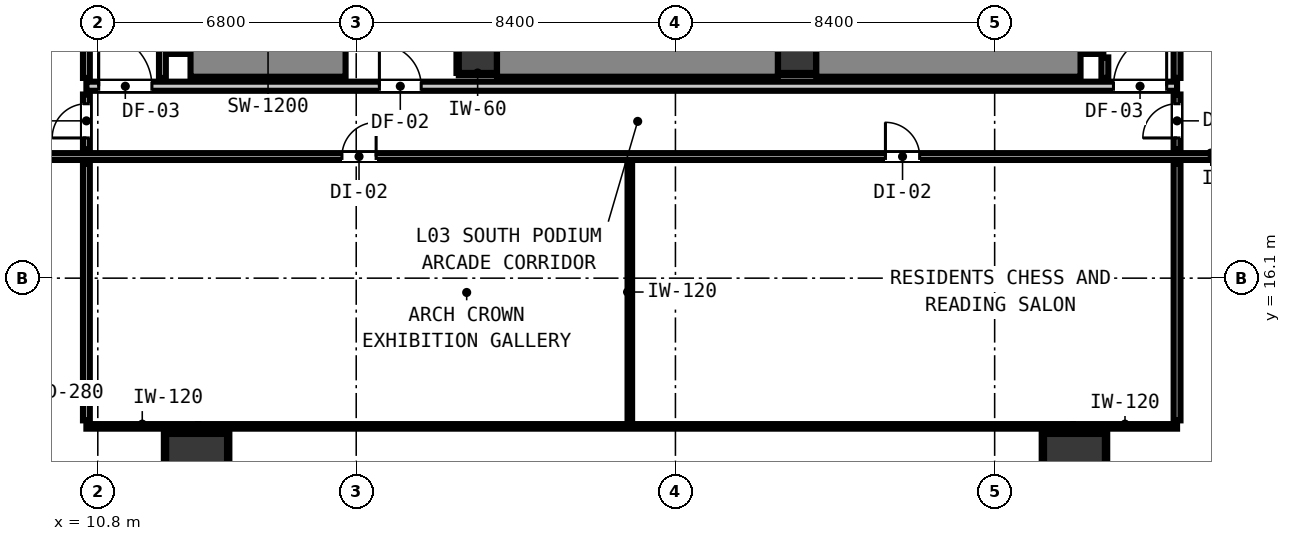
"""IFC4 building model, lengths in metres.
Left out: names, types, materials, properties, quantities, classifications, styles, units other than length and angle.
Written with IfcOpenShell. Run it as: python <this file> out.ifc"""

import sys

from ifc_helpers import new_model, si_unit, direction, frame, frame_2d, origin, origin_2d, place, context, subcontext, project, spatial, rectangle, extrude, element, fill, save


model = new_model("IFC4")
c1 = context("Model", 3, precision=1e-05, world=origin(), true_north=direction((0.0, 1.0)))
c2 = subcontext(c1, "Body", "Model", "MODEL_VIEW")
j1 = project(units=[si_unit("LENGTHUNIT", "METRE"), si_unit("PLANEANGLEUNIT", "RADIAN")], contexts=[c1])
p1 = place(None, origin())
s1 = spatial("IfcSite", under=j1, at=p1, CompositionType="ELEMENT")
p2 = place(p1, origin())
s2 = spatial("IfcBuilding", under=s1, at=p2, CompositionType="ELEMENT")
p3 = place(p2, frame((0.0, 0.0, 13.6)))
s3 = spatial("IfcBuildingStorey", under=s2, at=p3, CompositionType="ELEMENT", Elevation=13.6)
for number, where, z_axis, x_axis in (
    (1, (20.8, 22.0, 0.0), (0.0, 0.0, 1.0), (1.0, 0.0, 0.0)),
    (2, (29.2, 22.0, 0.0), (0.0, 0.0, 1.0), (1.0, 0.0, 0.0)),
):
    element("IfcColumn", number, at=place(p3, frame(where, z_axis=z_axis, x_axis=x_axis)), inside=s3, PredefinedType="COLUMN", context=c2, shape_type="SweptSolid", body=[
        extrude(rectangle(XDim=1.0, YDim=1.0, at=origin_2d()), origin(), (0.0, 0.0, 1.0), 4.2),
    ])
p4 = place(p3, frame((13.24, 22.0, 0.0), z_axis=(0.0, 0.0, 1.0), x_axis=(0.0, 1.0, 0.0)))
e3 = element("IfcWall", 3, at=p4, inside=s3, PredefinedType="SHEAR", context=c2, shape_type="SweptSolid", body=[
    extrude(rectangle(XDim=8.195, YDim=1.2, at=frame_2d((4.098, 0.0))), origin(), (0.0, 0.0, 1.0), 4.2),
])
p5 = place(p3, frame((13.24, 22.0, 0.0), z_axis=(0.0, 0.0, 1.0), x_axis=(1.0, 0.0, 0.0)))
e4 = element("IfcWall", 4, at=p5, inside=s3, PredefinedType="SHEAR", context=c2, shape_type="SweptSolid", body=[
    extrude(rectangle(XDim=4.08, YDim=1.2, at=frame_2d((2.04, 0.0))), origin(), (0.0, 0.0, 1.0), 4.2),
])
p6 = place(p3, frame((36.66, 22.0, 0.0), z_axis=(0.0, 0.0, 1.0), x_axis=(0.0, 1.0, 0.0)))
e5 = element("IfcWall", 5, at=p6, inside=s3, PredefinedType="SHEAR", context=c2, shape_type="SweptSolid", body=[
    extrude(rectangle(XDim=8.195, YDim=1.2, at=frame_2d((4.098, 0.0))), origin(), (0.0, 0.0, 1.0), 4.2),
])
p7 = place(p3, frame((29.705, 22.0, 0.0), z_axis=(0.0, 0.0, 1.0), x_axis=(1.0, 0.0, 0.0)))
e6 = element("IfcWall", 6, at=p7, inside=s3, PredefinedType="SHEAR", context=c2, shape_type="SweptSolid", body=[
    extrude(rectangle(XDim=6.955, YDim=1.2, at=frame_2d((3.478, 0.0))), origin(), (0.0, 0.0, 1.0), 4.2),
])
p8 = place(p3, frame((21.305, 22.0, 0.0), z_axis=(0.0, 0.0, 1.0), x_axis=(1.0, 0.0, 0.0)))
e7 = element("IfcWall", 7, at=p8, inside=s3, PredefinedType="SHEAR", context=c2, shape_type="SweptSolid", body=[
    extrude(rectangle(XDim=7.39, YDim=1.2, at=frame_2d((3.695, 0.0))), origin(), (0.0, 0.0, 1.0), 4.2),
])
for number, where, z_axis, x_axis in (
    (8, (13.4, 11.2, 0.0), (0.0, 0.0, 1.0), (1.0, 0.0, 0.0)),
    (9, (36.5, 11.2, 0.0), (0.0, 0.0, 1.0), (1.0, 0.0, 0.0)),
):
    element("IfcColumn", number, at=place(p3, frame(where, z_axis=z_axis, x_axis=x_axis)), inside=s3, PredefinedType="COLUMN", context=c2, shape_type="SweptSolid", body=[
        extrude(rectangle(XDim=1.6, YDim=1.6, at=origin_2d()), origin(), (0.0, 0.0, 1.0), 4.2),
    ])
p9 = place(p3, frame((10.5, 21.15, 0.0), z_axis=(0.0, 0.0, 1.0), x_axis=(1.0, 0.0, 0.0)))
e10 = element("IfcWall", 10, at=p9, inside=s3, PredefinedType="PARTITIONING", context=c2, shape_type="SweptSolid", body=[
    extrude(rectangle(XDim=28.7, YDim=0.24, at=frame_2d((14.35, 0.0))), origin(), (0.0, 0.0, 1.0), 3.78),
])
p10 = place(p9, frame((7.71, 0.0, 0.0)))
e11 = element("IfcOpeningElement", 11, at=p10, cuts=e10, PredefinedType="OPENING", context=c2, shape_type="SweptSolid", body=[
    extrude(rectangle(XDim=1.1, YDim=2.15, at=frame_2d((0.55, 1.075))), frame((0.0, 0.13, 0.0), z_axis=(0.0, -1.0, 0.0), x_axis=(1.0, 0.0, 0.0)), (0.0, 0.0, 1.0), 0.26),
])
p11 = place(p9, frame((0.324, 0.0, 0.0)))
e12 = element("IfcOpeningElement", 12, at=p11, cuts=e10, PredefinedType="OPENING", context=c2, shape_type="SweptSolid", body=[
    extrude(rectangle(XDim=1.4, YDim=2.15, at=frame_2d((0.7, 1.075))), frame((0.0, 0.13, 0.0), z_axis=(0.0, -1.0, 0.0), x_axis=(1.0, 0.0, 0.0)), (0.0, 0.0, 1.0), 0.26),
])
p12 = place(p9, frame((27.026, 0.0, 0.0)))
e13 = element("IfcOpeningElement", 13, at=p12, cuts=e10, PredefinedType="OPENING", context=c2, shape_type="SweptSolid", body=[
    extrude(rectangle(XDim=1.4, YDim=2.15, at=frame_2d((0.7, 1.075))), frame((0.0, 0.13, 0.0), z_axis=(0.0, -1.0, 0.0), x_axis=(1.0, 0.0, 0.0)), (0.0, 0.0, 1.0), 0.26),
])
p13 = place(p3, frame((4.352, 19.3, 0.0), z_axis=(0.0, 0.0, 1.0), x_axis=(1.0, 0.0, 0.0)))
e14 = element("IfcWall", 14, at=p13, inside=s3, PredefinedType="PARTITIONING", context=c2, shape_type="SweptSolid", body=[
    extrude(rectangle(XDim=43.296, YDim=0.18, at=frame_2d((21.648, 0.0))), origin(), (0.0, 0.0, 1.0), 3.78),
])
p14 = place(p13, frame((12.872, 0.0, 0.0)))
e15 = element("IfcOpeningElement", 15, at=p14, cuts=e14, PredefinedType="OPENING", context=c2, shape_type="SweptSolid", body=[
    extrude(rectangle(XDim=0.9, YDim=2.1, at=frame_2d((0.45, 1.05))), frame((0.0, 0.1, 0.0), z_axis=(0.0, -1.0, 0.0), x_axis=(1.0, 0.0, 0.0)), (0.0, 0.0, 1.0), 0.2),
])
p15 = place(p13, frame((27.174, 0.0, 0.0)))
e16 = element("IfcOpeningElement", 16, at=p15, cuts=e14, PredefinedType="OPENING", context=c2, shape_type="SweptSolid", body=[
    extrude(rectangle(XDim=0.9, YDim=2.1, at=frame_2d((0.45, 1.05))), frame((0.0, 0.1, 0.0), z_axis=(0.0, -1.0, 0.0), x_axis=(1.0, 0.0, 0.0)), (0.0, 0.0, 1.0), 0.2),
])
p16 = place(p3, frame((10.5, 12.2, 0.0), z_axis=(0.0, 0.0, 1.0), x_axis=(1.0, 0.0, 0.0)))
e17 = element("IfcWall", 17, at=p16, inside=s3, PredefinedType="PARTITIONING", context=c2, shape_type="SweptSolid", body=[
    extrude(rectangle(XDim=2.94, YDim=0.12, at=frame_2d((1.47, 0.0))), origin(), (0.0, 0.0, 1.0), 1.565),
])
p17 = place(p3, frame((13.44, 12.2, 0.0), z_axis=(0.0, 0.0, 1.0), x_axis=(1.0, 0.0, 0.0)))
e18 = element("IfcWall", 18, at=p17, inside=s3, PredefinedType="PARTITIONING", context=c2, shape_type="SweptSolid", body=[
    extrude(rectangle(XDim=23.02, YDim=0.12, at=frame_2d((11.51, 0.0))), origin(), (0.0, 0.0, 1.0), 3.78),
])
p18 = place(p3, frame((36.46, 12.2, 0.0), z_axis=(0.0, 0.0, 1.0), x_axis=(1.0, 0.0, 0.0)))
e19 = element("IfcWall", 19, at=p18, inside=s3, PredefinedType="PARTITIONING", context=c2, shape_type="SweptSolid", body=[
    extrude(rectangle(XDim=2.74, YDim=0.12, at=frame_2d((1.37, 0.0))), origin(), (0.0, 0.0, 1.0), 1.565),
])
p19 = place(p3, frame((10.5, 12.358, 0.0), z_axis=(0.0, 0.0, 1.0), x_axis=(0.0, 1.0, 0.0)))
e20 = element("IfcWall", 20, at=p19, inside=s3, PredefinedType="PARTITIONING", context=c2, shape_type="SweptSolid", body=[
    extrude(rectangle(XDim=6.754, YDim=0.18, at=frame_2d((3.377, 0.0))), origin(), (0.0, 0.0, 1.0), 3.78),
])
p20 = place(p3, frame((10.5, 19.488, 0.0), z_axis=(0.0, 0.0, 1.0), x_axis=(0.0, 1.0, 0.0)))
e21 = element("IfcWall", 21, at=p20, inside=s3, PredefinedType="PARTITIONING", context=c2, shape_type="SweptSolid", body=[
    extrude(rectangle(XDim=1.444, YDim=0.18, at=frame_2d((0.722, 0.0))), origin(), (0.0, 0.0, 1.0), 3.78),
])
p21 = place(p20, frame((0.301, 0.0, 0.0)))
e22 = element("IfcOpeningElement", 22, at=p21, cuts=e21, PredefinedType="OPENING", context=c2, shape_type="SweptSolid", body=[
    extrude(rectangle(XDim=0.9, YDim=2.1, at=frame_2d((0.45, 1.05))), frame((0.0, 0.1, 0.0), z_axis=(0.0, -1.0, 0.0), x_axis=(1.0, 0.0, 0.0)), (0.0, 0.0, 1.0), 0.2),
])
for number, where, z_axis, x_axis in (
    (23, (10.5, 21.368, 0.0), (0.0, 0.0, 1.0), (0.0, 1.0, 0.0)),
    (24, (12.5, 21.368, 0.0), (0.0, 0.0, 1.0), (0.0, 1.0, 0.0)),
):
    element("IfcWall", number, at=place(p3, frame(where, z_axis=z_axis, x_axis=x_axis)), inside=s3, PredefinedType="PARTITIONING", context=c2, shape_type="SweptSolid", body=[
        extrude(rectangle(XDim=18.694, YDim=0.18, at=frame_2d((9.347, 0.0))), origin(), (0.0, 0.0, 1.0), 3.78),
    ])
p22 = place(p3, frame((37.3, 21.368, 0.0), z_axis=(0.0, 0.0, 1.0), x_axis=(0.0, 1.0, 0.0)))
e25 = element("IfcWall", 25, at=p22, inside=s3, PredefinedType="PARTITIONING", context=c2, shape_type="SweptSolid", body=[
    extrude(rectangle(XDim=0.54, YDim=0.18, at=frame_2d((0.27, 0.0))), origin(), (0.0, 0.0, 1.0), 3.78),
])
p23 = place(p3, frame((39.2, 12.358, 0.0), z_axis=(0.0, 0.0, 1.0), x_axis=(0.0, 1.0, 0.0)))
e26 = element("IfcWall", 26, at=p23, inside=s3, PredefinedType="PARTITIONING", context=c2, shape_type="SweptSolid", body=[
    extrude(rectangle(XDim=6.754, YDim=0.18, at=frame_2d((3.377, 0.0))), origin(), (0.0, 0.0, 1.0), 3.78),
])
p24 = place(p3, frame((39.2, 19.488, 0.0), z_axis=(0.0, 0.0, 1.0), x_axis=(0.0, 1.0, 0.0)))
e27 = element("IfcWall", 27, at=p24, inside=s3, PredefinedType="PARTITIONING", context=c2, shape_type="SweptSolid", body=[
    extrude(rectangle(XDim=1.444, YDim=0.18, at=frame_2d((0.722, 0.0))), origin(), (0.0, 0.0, 1.0), 3.78),
])
p25 = place(p24, frame((0.301, 0.0, 0.0)))
e28 = element("IfcOpeningElement", 28, at=p25, cuts=e27, PredefinedType="OPENING", context=c2, shape_type="SweptSolid", body=[
    extrude(rectangle(XDim=0.9, YDim=2.1, at=frame_2d((0.45, 1.05))), frame((0.0, 0.1, 0.0), z_axis=(0.0, -1.0, 0.0), x_axis=(1.0, 0.0, 0.0)), (0.0, 0.0, 1.0), 0.2),
])
p26 = place(p3, frame((39.2, 21.368, 0.0), z_axis=(0.0, 0.0, 1.0), x_axis=(0.0, 1.0, 0.0)))
e29 = element("IfcWall", 29, at=p26, inside=s3, PredefinedType="PARTITIONING", context=c2, shape_type="SweptSolid", body=[
    extrude(rectangle(XDim=18.694, YDim=0.18, at=frame_2d((9.347, 0.0))), origin(), (0.0, 0.0, 1.0), 3.78),
])
p27 = place(p3, frame((24.8, 12.328, 0.0), z_axis=(0.0, 0.0, 1.0), x_axis=(0.0, 1.0, 0.0)))
e30 = element("IfcWall", 30, at=p27, inside=s3, PredefinedType="PARTITIONING", context=c2, shape_type="SweptSolid", body=[
    extrude(rectangle(XDim=6.814, YDim=0.12, at=frame_2d((3.407, 0.0))), origin(), (0.0, 0.0, 1.0), 3.78),
])
p28 = place(p3, frame((20.3, 21.468, 0.0), z_axis=(0.0, 0.0, 1.0), x_axis=(1.0, 0.0, 0.0)))
e31 = element("IfcWall", 31, at=p28, inside=s3, PredefinedType="PARTITIONING", context=c2, shape_type="SweptSolid", body=[
    extrude(rectangle(XDim=0.99, YDim=0.06, at=frame_2d((0.495, 0.0))), origin(), (0.0, 0.0, 1.0), 1.45),
])
p29 = place(p3, frame((20.268, 21.5, 0.0), z_axis=(0.0, 0.0, 1.0), x_axis=(0.0, 1.0, 0.0)))
e32 = element("IfcWall", 32, at=p29, inside=s3, PredefinedType="PARTITIONING", context=c2, shape_type="SweptSolid", body=[
    extrude(rectangle(XDim=1.0, YDim=0.06, at=frame_2d((0.5, 0.0))), origin(), (0.0, 0.0, 1.0), 1.45),
])
p30 = place(p3, frame((28.71, 21.468, 0.0), z_axis=(0.0, 0.0, 1.0), x_axis=(1.0, 0.0, 0.0)))
e33 = element("IfcWall", 33, at=p30, inside=s3, PredefinedType="PARTITIONING", context=c2, shape_type="SweptSolid", body=[
    extrude(rectangle(XDim=0.98, YDim=0.06, at=frame_2d((0.49, 0.0))), origin(), (0.0, 0.0, 1.0), 1.45),
])
p31 = place(p3, frame((12.6, 12.032, 0.0), z_axis=(0.0, 0.0, 1.0), x_axis=(1.0, 0.0, 0.0)))
e34 = element("IfcWall", 34, at=p31, inside=s3, PredefinedType="PARTITIONING", context=c2, shape_type="SweptSolid", body=[
    extrude(rectangle(XDim=1.6, YDim=0.06, at=frame_2d((0.8, 0.0))), origin(), (0.0, 0.0, 1.0), 1.45),
])
for number, where, z_axis, x_axis in (
    (35, (12.568, 10.4, 0.0), (0.0, 0.0, 1.0), (0.0, 1.0, 0.0)),
    (36, (14.232, 10.4, 0.0), (0.0, 0.0, 1.0), (0.0, 1.0, 0.0)),
    (37, (35.7, 12.032, 0.0), (0.0, 0.0, 1.0), (1.0, 0.0, 0.0)),
    (38, (35.668, 10.4, 0.0), (0.0, 0.0, 1.0), (0.0, 1.0, 0.0)),
    (39, (37.332, 10.4, 0.0), (0.0, 0.0, 1.0), (0.0, 1.0, 0.0)),
):
    element("IfcWall", number, at=place(p3, frame(where, z_axis=z_axis, x_axis=x_axis)), inside=s3, PredefinedType="PARTITIONING", context=c2, shape_type="SweptSolid", body=[
        extrude(rectangle(XDim=1.6, YDim=0.06, at=frame_2d((0.8, 0.0))), origin(), (0.0, 0.0, 1.0), 1.45),
    ])
p32 = place(p10, origin())
e40 = element("IfcDoor", 40, at=p32, inside=s3, OperationType="SINGLE_SWING_LEFT", PredefinedType="DOOR", context=c2, shape_type="SweptSolid", body=[
    extrude(rectangle(XDim=1.1, YDim=2.15, at=frame_2d((0.55, 1.075))), frame((0.0, 0.025, 0.0), z_axis=(0.0, -1.0, 0.0), x_axis=(1.0, 0.0, 0.0)), (0.0, 0.0, 1.0), 0.05),
])
fill(e11, e40)
p33 = place(p11, origin())
e41 = element("IfcDoor", 41, at=p33, inside=s3, OperationType="SINGLE_SWING_LEFT", PredefinedType="DOOR", context=c2, shape_type="SweptSolid", body=[
    extrude(rectangle(XDim=1.4, YDim=2.15, at=frame_2d((0.7, 1.075))), frame((0.0, 0.025, 0.0), z_axis=(0.0, -1.0, 0.0), x_axis=(1.0, 0.0, 0.0)), (0.0, 0.0, 1.0), 0.05),
])
fill(e12, e41)
p34 = place(p12, origin())
e42 = element("IfcDoor", 42, at=p34, inside=s3, OperationType="SINGLE_SWING_RIGHT", PredefinedType="DOOR", context=c2, shape_type="SweptSolid", body=[
    extrude(rectangle(XDim=1.4, YDim=2.15, at=frame_2d((0.7, 1.075))), frame((0.0, 0.025, 0.0), z_axis=(0.0, -1.0, 0.0), x_axis=(1.0, 0.0, 0.0)), (0.0, 0.0, 1.0), 0.05),
])
fill(e13, e42)
p35 = place(p21, origin())
e43 = element("IfcDoor", 43, at=p35, inside=s3, OperationType="SINGLE_SWING_LEFT", PredefinedType="DOOR", context=c2, shape_type="SweptSolid", body=[
    extrude(rectangle(XDim=0.9, YDim=2.1, at=frame_2d((0.45, 1.05))), frame((0.0, 0.025, 0.0), z_axis=(0.0, -1.0, 0.0), x_axis=(1.0, 0.0, 0.0)), (0.0, 0.0, 1.0), 0.05),
])
fill(e22, e43)
p36 = place(p25, origin())
e44 = element("IfcDoor", 44, at=p36, inside=s3, OperationType="SINGLE_SWING_LEFT", PredefinedType="DOOR", context=c2, shape_type="SweptSolid", body=[
    extrude(rectangle(XDim=0.9, YDim=2.1, at=frame_2d((0.45, 1.05))), frame((0.0, 0.025, 0.0), z_axis=(0.0, -1.0, 0.0), x_axis=(1.0, 0.0, 0.0)), (0.0, 0.0, 1.0), 0.05),
])
fill(e28, e44)
p37 = place(p14, origin())
e45 = element("IfcDoor", 45, at=p37, inside=s3, OperationType="SINGLE_SWING_RIGHT", PredefinedType="DOOR", context=c2, shape_type="SweptSolid", body=[
    extrude(rectangle(XDim=0.9, YDim=2.1, at=frame_2d((0.45, 1.05))), frame((0.0, 0.025, 0.0), z_axis=(0.0, -1.0, 0.0), x_axis=(1.0, 0.0, 0.0)), (0.0, 0.0, 1.0), 0.05),
])
fill(e15, e45)
p38 = place(p15, origin())
e46 = element("IfcDoor", 46, at=p38, inside=s3, OperationType="SINGLE_SWING_LEFT", PredefinedType="DOOR", context=c2, shape_type="SweptSolid", body=[
    extrude(rectangle(XDim=0.9, YDim=2.1, at=frame_2d((0.45, 1.05))), frame((0.0, 0.025, 0.0), z_axis=(0.0, -1.0, 0.0), x_axis=(1.0, 0.0, 0.0)), (0.0, 0.0, 1.0), 0.05),
])
fill(e16, e46)
save(model, sys.argv[1])
